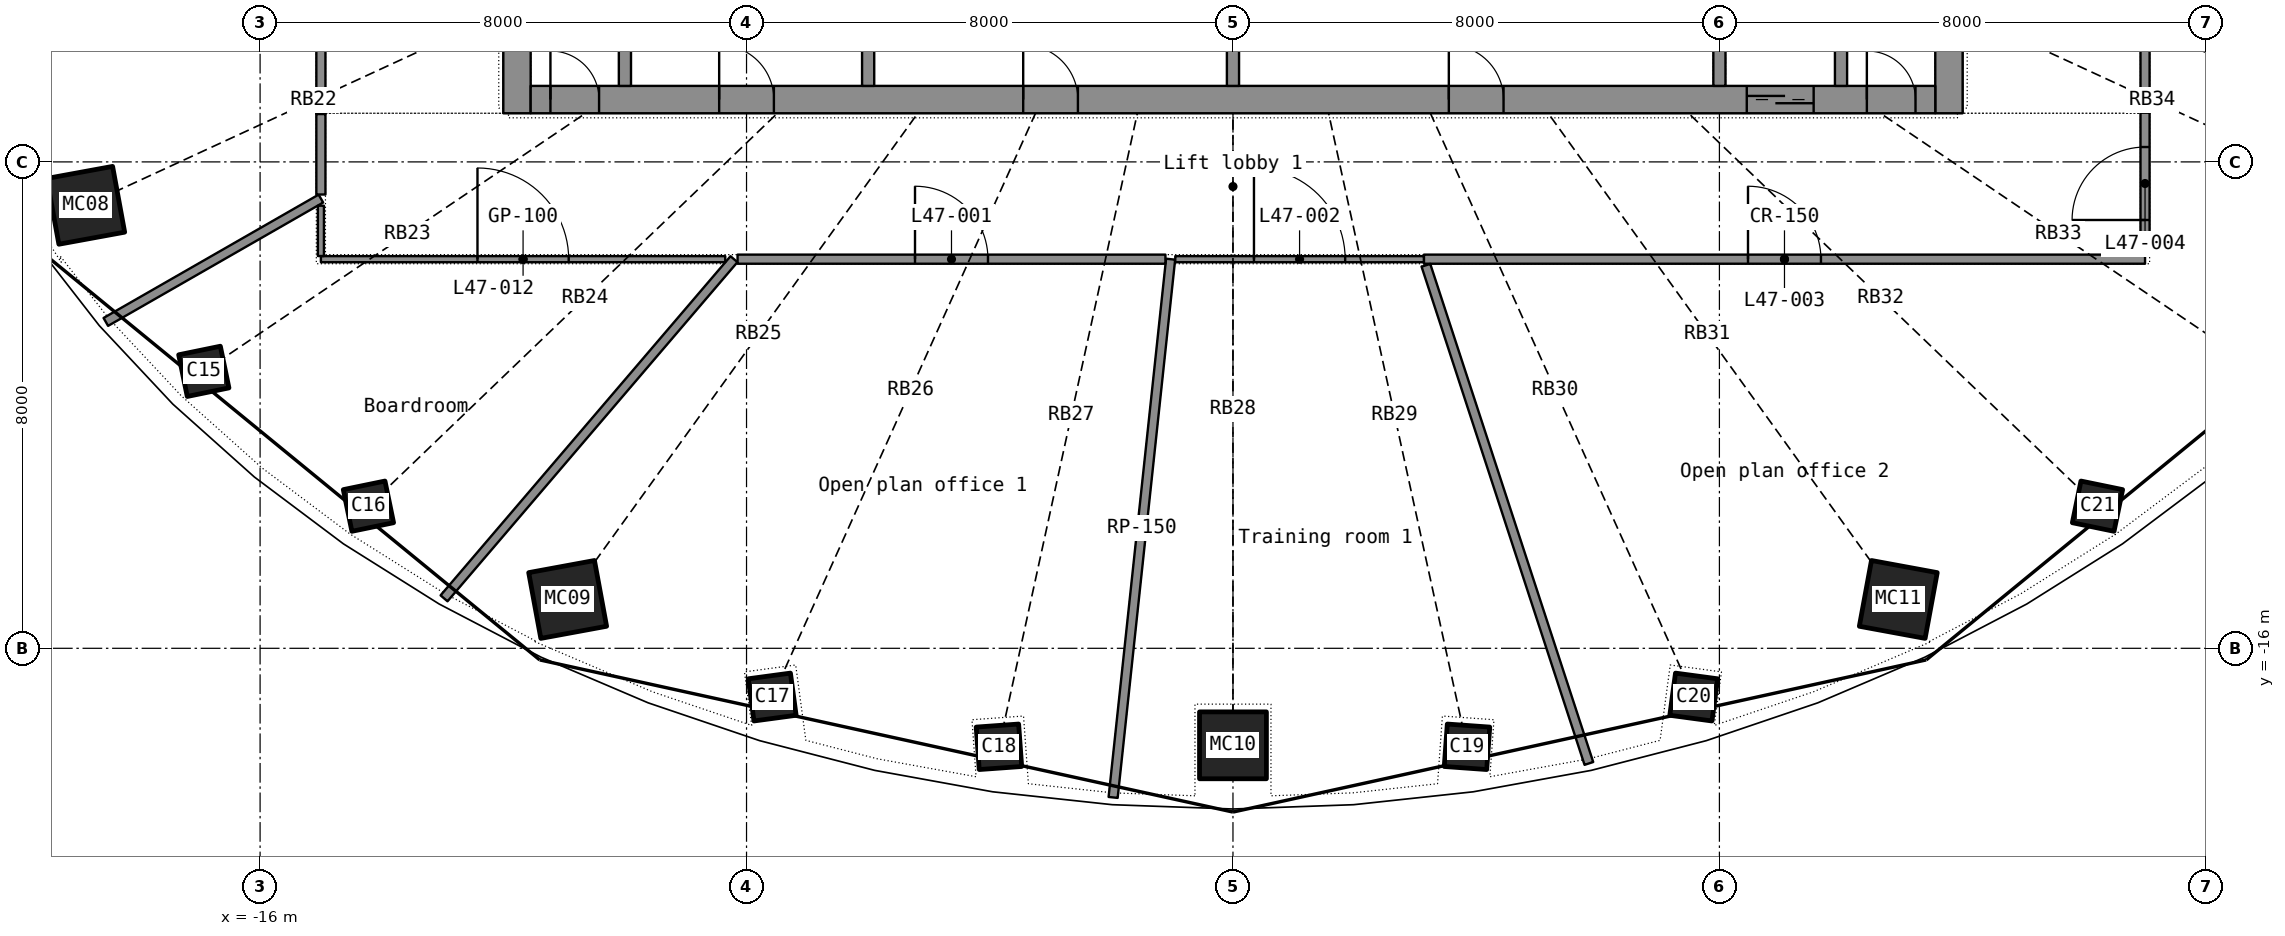
"""IFC4 building model, lengths in metres.
Left out: names, types, materials, properties, quantities, classifications, styles, units other than length and angle.
Written with IfcOpenShell. Run it as: python <this file> out.ifc"""

import sys

from ifc_helpers import new_model, si_unit, direction, frame, frame_2d, origin, origin_2d, place, context, subcontext, project, spatial, rectangle, hollow_rectangle, extrude, element, fill, save


model = new_model("IFC4")
c1 = context("Model", 3, precision=1e-05, world=origin(), true_north=direction((0.0, 1.0)))
c2 = subcontext(c1, "Body", "Model", "MODEL_VIEW")
j1 = project(units=[si_unit("LENGTHUNIT", "METRE"), si_unit("PLANEANGLEUNIT", "RADIAN")], contexts=[c1])
p1 = place(None, origin())
s1 = spatial("IfcSite", under=j1, at=p1, CompositionType="ELEMENT")
p2 = place(p1, origin())
s2 = spatial("IfcBuilding", under=s1, at=p2, CompositionType="ELEMENT")
p3 = place(p2, frame((0.0, 0.0, 194.1)))
s3 = spatial("IfcBuildingStorey", under=s2, at=p3, CompositionType="ELEMENT", Elevation=194.1)
p4 = place(p3, frame((-18.867, -8.714, 0.0), z_axis=(0.029940667, 0.01417895, 0.999451106), x_axis=(-0.583859188, 0.811832967, 0.005973473)))
e1 = element("IfcColumn", 1, at=p4, inside=s3, PredefinedType="COLUMN", context=c2, shape_type="SweptSolid", body=[
    extrude(hollow_rectangle(XDim=1.1, YDim=1.1, WallThickness=0.032, at=origin_2d()), origin(), (0.0, 0.0, 1.0), 3.702),
])
p5 = place(p3, frame((-16.926, -11.445, 0.0), z_axis=(0.026512179, 0.018202391, 0.999482755), x_axis=(-0.720419372, 0.693508429, 0.006479727)))
e2 = element("IfcColumn", 2, at=p5, inside=s3, PredefinedType="COLUMN", context=c2, shape_type="SweptSolid", body=[
    extrude(hollow_rectangle(XDim=0.7, YDim=0.7, WallThickness=0.025, at=origin_2d()), origin(), (0.0, 0.0, 1.0), 3.702),
])
p6 = place(p3, frame((-14.218, -13.662, 0.0), z_axis=(0.022226156, 0.021698532, 0.999517469), x_axis=(-0.828497152, 0.559958207, 0.00626706)))
e3 = element("IfcColumn", 3, at=p6, inside=s3, PredefinedType="COLUMN", context=c2, shape_type="SweptSolid", body=[
    extrude(hollow_rectangle(XDim=0.7, YDim=0.7, WallThickness=0.025, at=origin_2d()), origin(), (0.0, 0.0, 1.0), 3.702),
])
p7 = place(p3, frame((-10.942, -15.197, 0.0), z_axis=(0.017280237, 0.024535299, 0.999549605), x_axis=(-0.908373055, 0.418125333, 0.005440522)))
e4 = element("IfcColumn", 4, at=p7, inside=s3, PredefinedType="COLUMN", context=c2, shape_type="SweptSolid", body=[
    extrude(hollow_rectangle(XDim=1.1, YDim=1.1, WallThickness=0.032, at=origin_2d()), origin(), (0.0, 0.0, 1.0), 3.702),
])
for number, where, z_axis, x_axis in (
    (5, (-7.578, -16.802, 0.0), (0.012, 0.027, 1.0), (-0.96, 0.281, 0.004)),
    (6, (-3.849, -17.62, 0.0), (0.006, 0.028, 1.0), (-0.99, 0.14, 0.002)),
):
    element("IfcColumn", number, at=place(p3, frame(where, z_axis=z_axis, x_axis=x_axis)), inside=s3, PredefinedType="COLUMN", context=c2, shape_type="SweptSolid", body=[
        extrude(hollow_rectangle(XDim=0.7, YDim=0.7, WallThickness=0.025, at=origin_2d()), origin(), (0.0, 0.0, 1.0), 3.701),
    ])
p8 = place(p3, frame((0.0, -17.596, 0.0), z_axis=(0.0, 0.02836206, 0.999597716), x_axis=(-1.0, 0.0, 0.0)))
e7 = element("IfcColumn", 7, at=p8, inside=s3, PredefinedType="COLUMN", context=c2, shape_type="SweptSolid", body=[
    extrude(hollow_rectangle(XDim=1.1, YDim=1.1, WallThickness=0.032, at=origin_2d()), origin(), (0.0, 0.0, 1.0), 3.701),
])
for number, where, z_axis, x_axis in (
    (8, (3.849, -17.62, 0.0), (-0.006, 0.028, 1.0), (-0.99, -0.14, -0.002)),
    (9, (7.578, -16.802, 0.0), (-0.012, 0.027, 1.0), (-0.96, -0.281, -0.004)),
):
    element("IfcColumn", number, at=place(p3, frame(where, z_axis=z_axis, x_axis=x_axis)), inside=s3, PredefinedType="COLUMN", context=c2, shape_type="SweptSolid", body=[
        extrude(hollow_rectangle(XDim=0.7, YDim=0.7, WallThickness=0.025, at=origin_2d()), origin(), (0.0, 0.0, 1.0), 3.701),
    ])
p9 = place(p3, frame((10.942, -15.197, 0.0), z_axis=(-0.017280237, 0.024535299, 0.999549605), x_axis=(-0.908373055, -0.418125333, -0.005440522)))
e10 = element("IfcColumn", 10, at=p9, inside=s3, PredefinedType="COLUMN", context=c2, shape_type="SweptSolid", body=[
    extrude(hollow_rectangle(XDim=1.1, YDim=1.1, WallThickness=0.032, at=origin_2d()), origin(), (0.0, 0.0, 1.0), 3.702),
])
p10 = place(p3, frame((14.218, -13.662, 0.0), z_axis=(-0.022226156, 0.021698532, 0.999517469), x_axis=(-0.828497152, -0.559958207, -0.00626706)))
e11 = element("IfcColumn", 11, at=p10, inside=s3, PredefinedType="COLUMN", context=c2, shape_type="SweptSolid", body=[
    extrude(hollow_rectangle(XDim=0.7, YDim=0.7, WallThickness=0.025, at=origin_2d()), origin(), (0.0, 0.0, 1.0), 3.702),
])
p11 = place(p3, frame((-11.775, -7.2, 0.0), z_axis=(0.0, 0.0, 1.0), x_axis=(0.0, 1.0, 0.0)))
e12 = element("IfcWall", 12, at=p11, inside=s3, PredefinedType="SHEAR", context=c2, shape_type="SweptSolid", body=[
    extrude(rectangle(XDim=14.4, YDim=0.45, at=frame_2d((7.2, 0.0))), origin(), (0.0, 0.0, 1.0), 3.3),
])
p12 = place(p11, frame((6.5, 0.0, 0.0)))
e13 = element("IfcOpeningElement", 13, at=p12, cuts=e12, PredefinedType="OPENING", context=c2, shape_type="SweptSolid", body=[
    extrude(rectangle(XDim=1.4, YDim=2.2, at=frame_2d((0.7, 1.1))), frame((0.0, 0.235, 0.0), z_axis=(0.0, -1.0, 0.0), x_axis=(1.0, 0.0, 0.0)), (0.0, 0.0, 1.0), 0.47),
])
p13 = place(p3, frame((11.775, -7.2, 0.0), z_axis=(0.0, 0.0, 1.0), x_axis=(0.0, 1.0, 0.0)))
e14 = element("IfcWall", 14, at=p13, inside=s3, PredefinedType="SHEAR", context=c2, shape_type="SweptSolid", body=[
    extrude(rectangle(XDim=14.4, YDim=0.45, at=frame_2d((7.2, 0.0))), origin(), (0.0, 0.0, 1.0), 3.3),
])
p14 = place(p13, frame((6.5, 0.0, 0.0)))
e15 = element("IfcOpeningElement", 15, at=p14, cuts=e14, PredefinedType="OPENING", context=c2, shape_type="SweptSolid", body=[
    extrude(rectangle(XDim=1.4, YDim=2.2, at=frame_2d((0.7, 1.1))), frame((0.0, 0.235, 0.0), z_axis=(0.0, -1.0, 0.0), x_axis=(1.0, 0.0, 0.0)), (0.0, 0.0, 1.0), 0.47),
])
p15 = place(p3, frame((-11.55, -6.975, 0.0), z_axis=(0.0, 0.0, 1.0), x_axis=(1.0, 0.0, 0.0)))
e16 = element("IfcWall", 16, at=p15, inside=s3, PredefinedType="SHEAR", context=c2, shape_type="SweptSolid", body=[
    extrude(rectangle(XDim=23.1, YDim=0.45, at=frame_2d((11.55, 0.0))), origin(), (0.0, 0.0, 1.0), 3.3),
])
p16 = place(p15, frame((20.0, 0.0, 0.0)))
e17 = element("IfcOpeningElement", 17, at=p16, cuts=e16, PredefinedType="OPENING", context=c2, shape_type="SweptSolid", body=[
    extrude(rectangle(XDim=1.1, YDim=2.2, at=frame_2d((0.55, 1.1))), frame((0.0, 0.235, 0.0), z_axis=(0.0, -1.0, 0.0), x_axis=(1.0, 0.0, 0.0)), (0.0, 0.0, 1.0), 0.47),
])
p17 = place(p15, frame((3.1, 0.0, 0.0)))
e18 = element("IfcOpeningElement", 18, at=p17, cuts=e16, PredefinedType="OPENING", context=c2, shape_type="SweptSolid", body=[
    extrude(rectangle(XDim=0.9, YDim=2.1, at=frame_2d((0.45, 1.05))), frame((0.0, 0.235, 0.0), z_axis=(0.0, -1.0, 0.0), x_axis=(1.0, 0.0, 0.0)), (0.0, 0.0, 1.0), 0.47),
])
p18 = place(p15, frame((8.1, 0.0, 0.0)))
e19 = element("IfcOpeningElement", 19, at=p18, cuts=e16, PredefinedType="OPENING", context=c2, shape_type="SweptSolid", body=[
    extrude(rectangle(XDim=0.9, YDim=2.1, at=frame_2d((0.45, 1.05))), frame((0.0, 0.235, 0.0), z_axis=(0.0, -1.0, 0.0), x_axis=(1.0, 0.0, 0.0)), (0.0, 0.0, 1.0), 0.47),
])
p19 = place(p15, frame((15.1, 0.0, 0.0)))
e20 = element("IfcOpeningElement", 20, at=p19, cuts=e16, PredefinedType="OPENING", context=c2, shape_type="SweptSolid", body=[
    extrude(rectangle(XDim=0.9, YDim=2.1, at=frame_2d((0.45, 1.05))), frame((0.0, 0.235, 0.0), z_axis=(0.0, -1.0, 0.0), x_axis=(1.0, 0.0, 0.0)), (0.0, 0.0, 1.0), 0.47),
])
p20 = place(p15, frame((0.325, 0.0, 0.0)))
e21 = element("IfcOpeningElement", 21, at=p20, cuts=e16, PredefinedType="OPENING", context=c2, shape_type="SweptSolid", body=[
    extrude(rectangle(XDim=0.8, YDim=2.05, at=frame_2d((0.4, 1.025))), frame((0.0, 0.235, 0.0), z_axis=(0.0, -1.0, 0.0), x_axis=(1.0, 0.0, 0.0)), (0.0, 0.0, 1.0), 0.47),
])
p21 = place(p15, frame((21.975, 0.0, 0.0)))
e22 = element("IfcOpeningElement", 22, at=p21, cuts=e16, PredefinedType="OPENING", context=c2, shape_type="SweptSolid", body=[
    extrude(rectangle(XDim=0.8, YDim=2.05, at=frame_2d((0.4, 1.025))), frame((0.0, 0.235, 0.0), z_axis=(0.0, -1.0, 0.0), x_axis=(1.0, 0.0, 0.0)), (0.0, 0.0, 1.0), 0.47),
])
for number, where, z_axis, x_axis in (
    (23, (-10.0, -6.75, 0.0), (0.0, 0.0, 1.0), (0.0, 1.0, 0.0)),
    (24, (8.0, -6.75, 0.0), (0.0, 0.0, 1.0), (0.0, 1.0, 0.0)),
    (25, (10.0, -6.75, 0.0), (0.0, 0.0, 1.0), (0.0, 1.0, 0.0)),
):
    element("IfcWall", number, at=place(p3, frame(where, z_axis=z_axis, x_axis=x_axis)), inside=s3, PredefinedType="SHEAR", context=c2, shape_type="SweptSolid", body=[
        extrude(rectangle(XDim=2.85, YDim=0.2, at=frame_2d((1.425, 0.0))), origin(), (0.0, 0.0, 1.0), 3.3),
    ])
for number, where, z_axis, x_axis in (
    (26, (-6.0, -6.75, 0.0), (0.0, 0.0, 1.0), (0.0, 1.0, 0.0)),
    (27, (0.0, -6.75, 0.0), (0.0, 0.0, 1.0), (0.0, 1.0, 0.0)),
):
    element("IfcWall", number, at=place(p3, frame(where, z_axis=z_axis, x_axis=x_axis)), inside=s3, PredefinedType="PARTITIONING", context=c2, shape_type="SweptSolid", body=[
        extrude(rectangle(XDim=2.85, YDim=0.2, at=frame_2d((1.425, 0.0))), origin(), (0.0, 0.0, 1.0), 3.3),
    ])
p22 = place(p3, frame((3.14, -9.6, 0.0), z_axis=(0.0, 0.0, 1.0), x_axis=(1.0, 0.0, 0.0)))
e28 = element("IfcWall", 28, at=p22, inside=s3, PredefinedType="PARTITIONING", context=c2, shape_type="SweptSolid", body=[
    extrude(rectangle(XDim=11.86, YDim=0.15, at=frame_2d((5.93, 0.0))), origin(), (0.0, 0.0, 1.0), 2.4),
])
p23 = place(p22, frame((5.33, 0.0, 0.0)))
e29 = element("IfcOpeningElement", 29, at=p23, cuts=e28, PredefinedType="OPENING", context=c2, shape_type="SweptSolid", body=[
    extrude(rectangle(XDim=1.2, YDim=2.2, at=frame_2d((0.6, 1.1))), frame((0.0, 0.085, 0.0), z_axis=(0.0, -1.0, 0.0), x_axis=(1.0, 0.0, 0.0)), (0.0, 0.0, 1.0), 0.17),
])
p24 = place(p3, frame((-1.971, -18.453, 0.0), z_axis=(0.0, 0.0, 1.0), x_axis=(0.106207781, 0.994343958, 0.0)))
e30 = element("IfcWall", 30, at=p24, inside=s3, PredefinedType="PARTITIONING", context=c2, shape_type="SweptSolid", body=[
    extrude(rectangle(XDim=8.903, YDim=0.15, at=frame_2d((4.451, 0.0))), origin(), (0.0, 0.0, 1.0), 2.4),
])
p25 = place(p3, frame((5.854, -17.894, 0.0), z_axis=(0.0, 0.0, 1.0), x_axis=(-0.310921391, 0.950435631, 0.0)))
e31 = element("IfcWall", 31, at=p25, inside=s3, PredefinedType="PARTITIONING", context=c2, shape_type="SweptSolid", body=[
    extrude(rectangle(XDim=8.621, YDim=0.15, at=frame_2d((4.311, 0.0))), origin(), (0.0, 0.0, 1.0), 2.4),
])
p26 = place(p3, frame((-8.207, -9.6, 0.0), z_axis=(0.0, 0.0, 1.0), x_axis=(-0.649790761, -0.760113128, 0.0)))
e32 = element("IfcWall", 32, at=p26, inside=s3, PredefinedType="PARTITIONING", context=c2, shape_type="SweptSolid", body=[
    extrude(rectangle(XDim=7.338, YDim=0.15, at=frame_2d((3.669, 0.0))), origin(), (0.0, 0.0, 1.0), 2.4),
])
p27 = place(p3, frame((-8.147, -9.6, 0.0), z_axis=(0.0, 0.0, 1.0), x_axis=(1.0, 0.0, 0.0)))
e33 = element("IfcWall", 33, at=p27, inside=s3, PredefinedType="PARTITIONING", context=c2, shape_type="SweptSolid", body=[
    extrude(rectangle(XDim=7.037, YDim=0.15, at=frame_2d((3.518, 0.0))), origin(), (0.0, 0.0, 1.0), 2.4),
])
p28 = place(p27, frame((2.918, 0.0, 0.0)))
e34 = element("IfcOpeningElement", 34, at=p28, cuts=e33, PredefinedType="OPENING", context=c2, shape_type="SweptSolid", body=[
    extrude(rectangle(XDim=1.2, YDim=2.2, at=frame_2d((0.6, 1.1))), frame((0.0, 0.085, 0.0), z_axis=(0.0, -1.0, 0.0), x_axis=(1.0, 0.0, 0.0)), (0.0, 0.0, 1.0), 0.17),
])
p29 = place(p3, frame((-15.0, -9.6, 0.0), z_axis=(0.0, 0.0, 1.0), x_axis=(1.0, 0.0, 0.0)))
e35 = element("IfcWall", 35, at=p29, inside=s3, PredefinedType="PARTITIONING", context=c2, shape_type="SweptSolid", body=[
    extrude(rectangle(XDim=6.65, YDim=0.1, at=frame_2d((3.325, 0.0))), origin(), (0.0, 0.0, 1.0), 2.4),
])
p30 = place(p29, frame((2.575, 0.0, 0.0)))
e36 = element("IfcOpeningElement", 36, at=p30, cuts=e35, PredefinedType="OPENING", context=c2, shape_type="SweptSolid", body=[
    extrude(rectangle(XDim=1.5, YDim=2.4, at=frame_2d((0.75, 1.2))), frame((0.0, 0.06, 0.0), z_axis=(0.0, -1.0, 0.0), x_axis=(1.0, 0.0, 0.0)), (0.0, 0.0, 1.0), 0.12),
])
p31 = place(p3, frame((20.515, -7.836, 0.0), z_axis=(0.0, 0.0, 1.0), x_axis=(-0.934186062, 0.356786213, 0.0)))
e37 = element("IfcWall", 37, at=p31, inside=s3, PredefinedType="PARTITIONING", context=c2, shape_type="SweptSolid", body=[
    extrude(rectangle(XDim=5.904, YDim=0.15, at=frame_2d((2.952, 0.0))), origin(), (0.0, 0.0, 1.0), 2.4),
])
p32 = place(p3, frame((-15.0, -1.8, 0.0), z_axis=(0.0, 0.0, 1.0), x_axis=(0.0, -1.0, 0.0)))
e38 = element("IfcWall", 38, at=p32, inside=s3, PredefinedType="PARTITIONING", context=c2, shape_type="SweptSolid", body=[
    extrude(rectangle(XDim=5.412, YDim=0.15, at=frame_2d((2.706, 0.0))), origin(), (0.0, 0.0, 1.0), 2.4),
])
p33 = place(p32, frame((2.106, 0.0, 0.0)))
e39 = element("IfcOpeningElement", 39, at=p33, cuts=e38, PredefinedType="OPENING", context=c2, shape_type="SweptSolid", body=[
    extrude(rectangle(XDim=1.2, YDim=2.2, at=frame_2d((0.6, 1.1))), frame((0.0, 0.085, 0.0), z_axis=(0.0, -1.0, 0.0), x_axis=(1.0, 0.0, 0.0)), (0.0, 0.0, 1.0), 0.17),
])
p34 = place(p3, frame((-0.949, -9.6, 0.0), z_axis=(0.0, 0.0, 1.0), x_axis=(1.0, 0.0, 0.0)))
e40 = element("IfcWall", 40, at=p34, inside=s3, PredefinedType="PARTITIONING", context=c2, shape_type="SweptSolid", body=[
    extrude(rectangle(XDim=4.088, YDim=0.1, at=frame_2d((2.044, 0.0))), origin(), (0.0, 0.0, 1.0), 2.4),
])
p35 = place(p34, frame((1.294, 0.0, 0.0)))
e41 = element("IfcOpeningElement", 41, at=p35, cuts=e40, PredefinedType="OPENING", context=c2, shape_type="SweptSolid", body=[
    extrude(rectangle(XDim=1.5, YDim=2.4, at=frame_2d((0.75, 1.2))), frame((0.0, 0.06, 0.0), z_axis=(0.0, -1.0, 0.0), x_axis=(1.0, 0.0, 0.0)), (0.0, 0.0, 1.0), 0.12),
])
p36 = place(p3, frame((-18.537, -10.632, 0.0), z_axis=(0.0, 0.0, 1.0), x_axis=(0.867438786, 0.49754392, 0.0)))
e42 = element("IfcWall", 42, at=p36, inside=s3, PredefinedType="PARTITIONING", context=c2, shape_type="SweptSolid", body=[
    extrude(rectangle(XDim=4.078, YDim=0.15, at=frame_2d((2.039, 0.0))), origin(), (0.0, 0.0, 1.0), 2.4),
])
p37 = place(p3, frame((15.0, -9.523, 0.0), z_axis=(0.0, 0.0, 1.0), x_axis=(0.0, 1.0, 0.0)))
e43 = element("IfcWall", 43, at=p37, inside=s3, PredefinedType="PARTITIONING", context=c2, shape_type="SweptSolid", body=[
    extrude(rectangle(XDim=2.335, YDim=0.15, at=frame_2d((1.167, 0.0))), origin(), (0.0, 0.0, 1.0), 2.4),
])
p38 = place(p37, frame((0.567, 0.0, 0.0)))
e44 = element("IfcOpeningElement", 44, at=p38, cuts=e43, PredefinedType="OPENING", context=c2, shape_type="SweptSolid", body=[
    extrude(rectangle(XDim=1.2, YDim=2.2, at=frame_2d((0.6, 1.1))), frame((0.0, 0.085, 0.0), z_axis=(0.0, -1.0, 0.0), x_axis=(1.0, 0.0, 0.0)), (0.0, 0.0, 1.0), 0.17),
])
p39 = place(p3, frame((15.0, -7.187, 0.0), z_axis=(0.0, 0.0, 1.0), x_axis=(0.0, 1.0, 0.0)))
e45 = element("IfcWall", 45, at=p39, inside=s3, PredefinedType="PARTITIONING", context=c2, shape_type="SweptSolid", body=[
    extrude(rectangle(XDim=1.347, YDim=0.15, at=frame_2d((0.673, 0.0))), origin(), (0.0, 0.0, 1.0), 2.4),
])
p40 = place(p3, frame((-15.0, -7.213, 0.0), z_axis=(0.0, 0.0, 1.0), x_axis=(0.0, -1.0, 0.0)))
e46 = element("IfcWall", 46, at=p40, inside=s3, PredefinedType="PARTITIONING", context=c2, shape_type="SweptSolid", body=[
    extrude(rectangle(XDim=1.323, YDim=0.15, at=frame_2d((0.662, 0.0))), origin(), (0.0, 0.0, 1.0), 2.4),
])
p41 = place(p3, frame((-15.0, -8.72, 0.0), z_axis=(0.0, 0.0, 1.0), x_axis=(0.0, -1.0, 0.0)))
e47 = element("IfcWall", 47, at=p41, inside=s3, PredefinedType="PARTITIONING", context=c2, shape_type="SweptSolid", body=[
    extrude(rectangle(XDim=0.828, YDim=0.1, at=frame_2d((0.414, 0.0))), origin(), (0.0, 0.0, 1.0), 2.4),
])
p42 = place(p16, origin())
e48 = element("IfcDoor", 48, at=p42, inside=s3, OperationType="DOUBLE_DOOR_SLIDING", PredefinedType="DOOR", context=c2, shape_type="SweptSolid", body=[
    extrude(rectangle(XDim=1.1, YDim=2.2, at=frame_2d((0.55, 1.1))), frame((0.0, 0.025, 0.0), z_axis=(0.0, -1.0, 0.0), x_axis=(1.0, 0.0, 0.0)), (0.0, 0.0, 1.0), 0.05),
])
fill(e17, e48)
p43 = place(p17, origin())
e49 = element("IfcDoor", 49, at=p43, inside=s3, OperationType="SINGLE_SWING_LEFT", PredefinedType="DOOR", context=c2, shape_type="SweptSolid", body=[
    extrude(rectangle(XDim=0.9, YDim=2.1, at=frame_2d((0.45, 1.05))), frame((0.0, 0.025, 0.0), z_axis=(0.0, -1.0, 0.0), x_axis=(1.0, 0.0, 0.0)), (0.0, 0.0, 1.0), 0.05),
])
fill(e18, e49)
p44 = place(p18, origin())
e50 = element("IfcDoor", 50, at=p44, inside=s3, OperationType="SINGLE_SWING_LEFT", PredefinedType="DOOR", context=c2, shape_type="SweptSolid", body=[
    extrude(rectangle(XDim=0.9, YDim=2.1, at=frame_2d((0.45, 1.05))), frame((0.0, 0.025, 0.0), z_axis=(0.0, -1.0, 0.0), x_axis=(1.0, 0.0, 0.0)), (0.0, 0.0, 1.0), 0.05),
])
fill(e19, e50)
p45 = place(p19, origin())
e51 = element("IfcDoor", 51, at=p45, inside=s3, OperationType="SINGLE_SWING_LEFT", PredefinedType="DOOR", context=c2, shape_type="SweptSolid", body=[
    extrude(rectangle(XDim=0.9, YDim=2.1, at=frame_2d((0.45, 1.05))), frame((0.0, 0.025, 0.0), z_axis=(0.0, -1.0, 0.0), x_axis=(1.0, 0.0, 0.0)), (0.0, 0.0, 1.0), 0.05),
])
fill(e20, e51)
p46 = place(p20, origin())
e52 = element("IfcDoor", 52, at=p46, inside=s3, OperationType="SINGLE_SWING_LEFT", PredefinedType="DOOR", context=c2, shape_type="SweptSolid", body=[
    extrude(rectangle(XDim=0.8, YDim=2.05, at=frame_2d((0.4, 1.025))), frame((0.0, 0.025, 0.0), z_axis=(0.0, -1.0, 0.0), x_axis=(1.0, 0.0, 0.0)), (0.0, 0.0, 1.0), 0.05),
])
fill(e21, e52)
p47 = place(p21, origin())
e53 = element("IfcDoor", 53, at=p47, inside=s3, OperationType="SINGLE_SWING_LEFT", PredefinedType="DOOR", context=c2, shape_type="SweptSolid", body=[
    extrude(rectangle(XDim=0.8, YDim=2.05, at=frame_2d((0.4, 1.025))), frame((0.0, 0.025, 0.0), z_axis=(0.0, -1.0, 0.0), x_axis=(1.0, 0.0, 0.0)), (0.0, 0.0, 1.0), 0.05),
])
fill(e22, e53)
p48 = place(p28, origin())
e54 = element("IfcDoor", 54, at=p48, inside=s3, OperationType="DOUBLE_DOOR_SINGLE_SWING", PredefinedType="DOOR", context=c2, shape_type="SweptSolid", body=[
    extrude(rectangle(XDim=1.2, YDim=2.2, at=frame_2d((0.6, 1.1))), frame((0.0, 0.025, 0.0), z_axis=(0.0, -1.0, 0.0), x_axis=(1.0, 0.0, 0.0)), (0.0, 0.0, 1.0), 0.05),
])
fill(e34, e54)
p49 = place(p35, origin())
e55 = element("IfcDoor", 55, at=p49, inside=s3, OperationType="DOUBLE_DOOR_SINGLE_SWING", PredefinedType="DOOR", context=c2, shape_type="SweptSolid", body=[
    extrude(rectangle(XDim=1.5, YDim=2.4, at=frame_2d((0.75, 1.2))), frame((0.0, 0.025, 0.0), z_axis=(0.0, -1.0, 0.0), x_axis=(1.0, 0.0, 0.0)), (0.0, 0.0, 1.0), 0.05),
])
fill(e41, e55)
p50 = place(p23, origin())
e56 = element("IfcDoor", 56, at=p50, inside=s3, OperationType="DOUBLE_DOOR_SINGLE_SWING", PredefinedType="DOOR", context=c2, shape_type="SweptSolid", body=[
    extrude(rectangle(XDim=1.2, YDim=2.2, at=frame_2d((0.6, 1.1))), frame((0.0, 0.025, 0.0), z_axis=(0.0, -1.0, 0.0), x_axis=(1.0, 0.0, 0.0)), (0.0, 0.0, 1.0), 0.05),
])
fill(e29, e56)
p51 = place(p38, origin())
e57 = element("IfcDoor", 57, at=p51, inside=s3, OperationType="DOUBLE_DOOR_SINGLE_SWING", PredefinedType="DOOR", context=c2, shape_type="SweptSolid", body=[
    extrude(rectangle(XDim=1.2, YDim=2.2, at=frame_2d((0.6, 1.1))), frame((0.0, 0.025, 0.0), z_axis=(0.0, -1.0, 0.0), x_axis=(1.0, 0.0, 0.0)), (0.0, 0.0, 1.0), 0.05),
])
fill(e44, e57)
p52 = place(p30, origin())
e58 = element("IfcDoor", 58, at=p52, inside=s3, OperationType="DOUBLE_DOOR_SINGLE_SWING", PredefinedType="DOOR", context=c2, shape_type="SweptSolid", body=[
    extrude(rectangle(XDim=1.5, YDim=2.4, at=frame_2d((0.75, 1.2))), frame((0.0, 0.025, 0.0), z_axis=(0.0, -1.0, 0.0), x_axis=(1.0, 0.0, 0.0)), (0.0, 0.0, 1.0), 0.05),
])
fill(e36, e58)
save(model, sys.argv[1])
